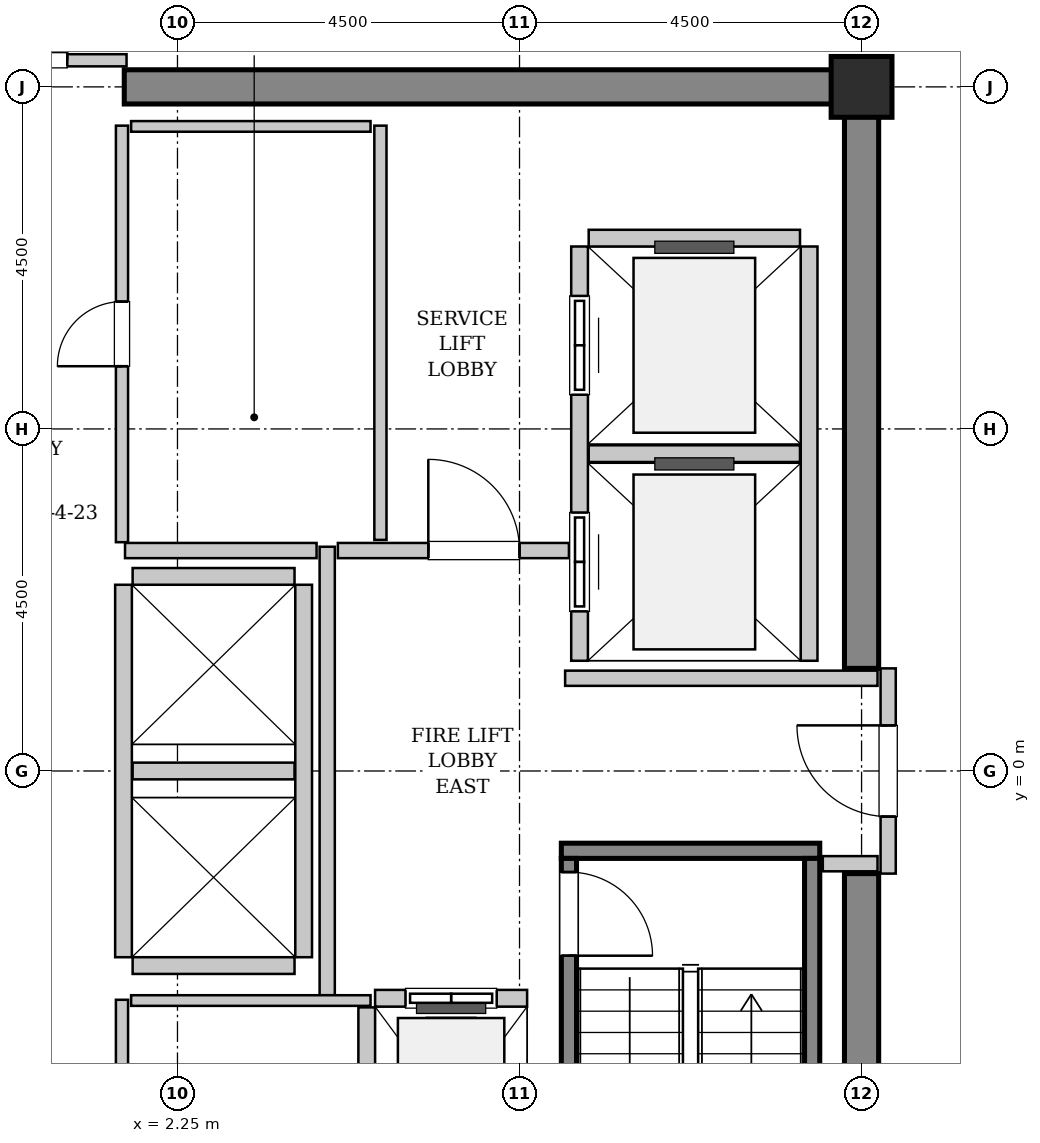
"""IFC4 building model, lengths in metres.
Left out: names, types, materials, properties, quantities, classifications, styles, units other than length and angle.
Written with IfcOpenShell. Run it as: python <this file> out.ifc"""

import sys

from ifc_helpers import new_model, si_unit, direction, frame, frame_2d, origin, origin_2d, place, context, subcontext, project, spatial, rectangle, hollow_rectangle, extrude, source, transform, mapped, element, fill, save


model = new_model("IFC4")
c1 = context("Model", 3, precision=1e-05, world=origin(), true_north=direction((0.0, 1.0)))
c2 = subcontext(c1, "Body", "Model", "MODEL_VIEW")
j1 = project(units=[si_unit("LENGTHUNIT", "METRE"), si_unit("PLANEANGLEUNIT", "RADIAN")], contexts=[c1])
p1 = place(None, origin())
s1 = spatial("IfcSite", under=j1, at=p1, CompositionType="ELEMENT")
p2 = place(p1, origin())
s2 = spatial("IfcBuilding", under=s1, at=p2, CompositionType="ELEMENT")
p3 = place(p2, frame((0.0, 0.0, 276.0)))
s3 = spatial("IfcBuildingStorey", under=s2, at=p3, CompositionType="ELEMENT", Elevation=276.0)
m1 = source(origin(), c2, "Body", "SweptSolid", [
    extrude(rectangle(XDim=9.925, YDim=0.45, at=frame_2d((4.962, 0.0))), origin(), (0.0, 0.0, 1.0), 3.8),
])
p4 = place(p3, frame((1.55, 9.0, 0.0), z_axis=(0.0, 0.0, 1.0), x_axis=(1.0, 0.0, 0.0)))
e1 = element("IfcWall", 1, at=p4, inside=s3, PredefinedType="SHEAR", context=c2, shape_type="MappedRepresentation", body=[
    mapped(m1, transform((0.0, 0.0, 0.0), x_axis=(1.0, 0.0, 0.0), y_axis=(0.0, 1.0, 0.0), z_axis=(0.0, 0.0, 1.0), scale=1.0)),
])
m2 = source(origin(), c2, "Body", "SweptSolid", [
    extrude(rectangle(XDim=7.425, YDim=0.45, at=frame_2d((3.712, 0.0))), origin(), (0.0, 0.0, 1.0), 3.8),
])
for number, where, z_axis, x_axis in (
    (2, (11.25, -8.775, 0.0), (0.0, 0.0, 1.0), (0.0, 1.0, 0.0)),
    (3, (11.25, 1.35, 0.0), (0.0, 0.0, 1.0), (0.0, 1.0, 0.0)),
):
    element("IfcWall", number, at=place(p3, frame(where, z_axis=z_axis, x_axis=x_axis)), inside=s3, PredefinedType="SHEAR", context=c2, shape_type="MappedRepresentation", body=[
        mapped(m2, transform((0.0, 0.0, 0.0), x_axis=(1.0, 0.0, 0.0), y_axis=(0.0, 1.0, 0.0), z_axis=(0.0, 0.0, 1.0), scale=1.0)),
    ])
m3 = source(origin(), c2, "Body", "SweptSolid", [
    extrude(hollow_rectangle(XDim=0.8, YDim=0.8, WallThickness=0.04, InnerFilletRadius=0.04, OuterFilletRadius=0.08, at=origin_2d()), origin(), (0.0, 0.0, 1.0), 3.8),
])
p5 = place(p3, frame((11.25, 9.0, 0.0), z_axis=(0.0, 0.0, 1.0), x_axis=(1.0, 0.0, 0.0)))
e4 = element("IfcColumn", 4, at=p5, inside=s3, PredefinedType="COLUMN", context=c2, shape_type="MappedRepresentation", body=[
    mapped(m3, transform((0.0, 0.0, 0.0), x_axis=(1.0, 0.0, 0.0), y_axis=(0.0, 1.0, 0.0), z_axis=(0.0, 0.0, 1.0), scale=1.0)),
])
m4 = source(origin(), c2, "Body", "SweptSolid", [
    extrude(rectangle(XDim=3.4, YDim=0.2, at=frame_2d((1.7, 0.0))), origin(), (0.0, 0.0, 1.0), 3.8),
])
p6 = place(p3, frame((7.3, -1.05, 0.0), z_axis=(0.0, 0.0, 1.0), x_axis=(1.0, 0.0, 0.0)))
e5 = element("IfcWall", 5, at=p6, inside=s3, PredefinedType="SOLIDWALL", context=c2, shape_type="MappedRepresentation", body=[
    mapped(m4, transform((0.0, 0.0, 0.0), x_axis=(1.0, 0.0, 0.0), y_axis=(0.0, 1.0, 0.0), z_axis=(0.0, 0.0, 1.0), scale=1.0)),
])
m5 = source(origin(), c2, "Body", "SweptSolid", [
    extrude(rectangle(XDim=7.1, YDim=0.2, at=frame_2d((3.55, 0.0))), origin(), (0.0, 0.0, 1.0), 3.8),
])
p7 = place(p3, frame((7.4, -1.15, 0.0), z_axis=(0.0, 0.0, 1.0), x_axis=(0.0, -1.0, 0.0)))
e6 = element("IfcWall", 6, at=p7, inside=s3, PredefinedType="SOLIDWALL", context=c2, shape_type="MappedRepresentation", body=[
    mapped(m5, transform((0.0, 0.0, 0.0), x_axis=(1.0, 0.0, 0.0), y_axis=(0.0, 1.0, 0.0), z_axis=(0.0, 0.0, 1.0), scale=1.0)),
])
p8 = place(p7, frame((0.18, 0.0, 0.0)))
e7 = element("IfcOpeningElement", 7, at=p8, cuts=e6, PredefinedType="OPENING", context=c2, shape_type="SweptSolid", body=[
    extrude(rectangle(XDim=1.1, YDim=2.15, at=frame_2d((0.55, 1.075))), frame((0.0, 0.11, 0.0), z_axis=(0.0, -1.0, 0.0), x_axis=(1.0, 0.0, 0.0)), (0.0, 0.0, 1.0), 0.22),
])
p9 = place(p3, frame((10.6, -1.15, 0.0), z_axis=(0.0, 0.0, 1.0), x_axis=(0.0, -1.0, 0.0)))
e8 = element("IfcWall", 8, at=p9, inside=s3, PredefinedType="SOLIDWALL", context=c2, shape_type="MappedRepresentation", body=[
    mapped(m5, transform((0.0, 0.0, 0.0), x_axis=(1.0, 0.0, 0.0), y_axis=(0.0, 1.0, 0.0), z_axis=(0.0, 0.0, 1.0), scale=1.0)),
])
m6 = source(origin(), c2, "Body", "SweptSolid", [
    extrude(rectangle(XDim=2.0, YDim=0.22, at=frame_2d((1.0, 0.0))), origin(), (0.0, 0.0, 1.0), 3.535),
])
p10 = place(p3, frame((6.85, -2.99, 0.0), z_axis=(0.0, 0.0, 1.0), x_axis=(-1.0, 0.0, 0.0)))
e9 = element("IfcWall", 9, at=p10, inside=s3, PredefinedType="SOLIDWALL", context=c2, shape_type="MappedRepresentation", body=[
    mapped(m6, transform((0.0, 0.0, 0.0), x_axis=(1.0, 0.0, 0.0), y_axis=(0.0, 1.0, 0.0), z_axis=(0.0, 0.0, 1.0), scale=1.0)),
])
p11 = place(p10, frame((0.4, 0.0, 0.0)))
e10 = element("IfcOpeningElement", 10, at=p11, cuts=e9, PredefinedType="OPENING", context=c2, shape_type="SweptSolid", body=[
    extrude(rectangle(XDim=1.2, YDim=2.2, at=frame_2d((0.6, 1.1))), frame((0.0, 0.12, 0.0), z_axis=(0.0, -1.0, 0.0), x_axis=(1.0, 0.0, 0.0)), (0.0, 0.0, 1.0), 0.24),
])
m7 = source(origin(), c2, "Body", "SweptSolid", [
    extrude(rectangle(XDim=2.68, YDim=0.22, at=frame_2d((1.34, 0.0))), origin(), (0.0, 0.0, 1.0), 3.535),
])
p12 = place(p3, frame((4.74, -3.11, 0.0), z_axis=(0.0, 0.0, 1.0), x_axis=(0.0, -1.0, 0.0)))
e11 = element("IfcWall", 11, at=p12, inside=s3, PredefinedType="SOLIDWALL", context=c2, shape_type="MappedRepresentation", body=[
    mapped(m7, transform((0.0, 0.0, 0.0), x_axis=(1.0, 0.0, 0.0), y_axis=(0.0, 1.0, 0.0), z_axis=(0.0, 0.0, 1.0), scale=1.0)),
])
m8 = source(origin(), c2, "Body", "SweptSolid", [
    extrude(rectangle(XDim=5.45, YDim=0.22, at=frame_2d((2.725, 0.0))), origin(), (0.0, 0.0, 1.0), 3.535),
])
p13 = place(p3, frame((7.54, 6.9, 0.0), z_axis=(0.0, 0.0, 1.0), x_axis=(0.0, -1.0, 0.0)))
e12 = element("IfcWall", 12, at=p13, inside=s3, PredefinedType="SOLIDWALL", context=c2, shape_type="MappedRepresentation", body=[
    mapped(m8, transform((0.0, 0.0, 0.0), x_axis=(1.0, 0.0, 0.0), y_axis=(0.0, 1.0, 0.0), z_axis=(0.0, 0.0, 1.0), scale=1.0)),
])
p14 = place(p13, frame((3.5, 0.0, 0.0)))
e13 = element("IfcOpeningElement", 13, at=p14, cuts=e12, PredefinedType="OPENING", context=c2, shape_type="SweptSolid", body=[
    extrude(rectangle(XDim=1.3, YDim=2.3, at=frame_2d((0.65, 1.15))), frame((0.0, 0.12, 0.0), z_axis=(0.0, -1.0, 0.0), x_axis=(1.0, 0.0, 0.0)), (0.0, 0.0, 1.0), 0.24),
])
p15 = place(p13, frame((0.65, 0.0, 0.0)))
e14 = element("IfcOpeningElement", 14, at=p15, cuts=e12, PredefinedType="OPENING", context=c2, shape_type="SweptSolid", body=[
    extrude(rectangle(XDim=1.3, YDim=2.3, at=frame_2d((0.65, 1.15))), frame((0.0, 0.12, 0.0), z_axis=(0.0, -1.0, 0.0), x_axis=(1.0, 0.0, 0.0)), (0.0, 0.0, 1.0), 0.24),
])
p16 = place(p3, frame((10.56, 1.45, 0.0), z_axis=(0.0, 0.0, 1.0), x_axis=(0.0, 1.0, 0.0)))
e15 = element("IfcWall", 15, at=p16, inside=s3, PredefinedType="SOLIDWALL", context=c2, shape_type="MappedRepresentation", body=[
    mapped(m8, transform((0.0, 0.0, 0.0), x_axis=(1.0, 0.0, 0.0), y_axis=(0.0, 1.0, 0.0), z_axis=(0.0, 0.0, 1.0), scale=1.0)),
])
m9 = source(origin(), c2, "Body", "SweptSolid", [
    extrude(rectangle(XDim=2.78, YDim=0.22, at=frame_2d((1.39, 0.0))), origin(), (0.0, 0.0, 1.0), 3.535),
])
for number, where, z_axis, x_axis in (
    (16, (7.66, 4.175, 0.0), (0.0, 0.0, 1.0), (1.0, 0.0, 0.0)),
    (17, (10.44, 7.01, 0.0), (0.0, 0.0, 1.0), (-1.0, 0.0, 0.0)),
):
    element("IfcWall", number, at=place(p3, frame(where, z_axis=z_axis, x_axis=x_axis)), inside=s3, PredefinedType="SOLIDWALL", context=c2, shape_type="MappedRepresentation", body=[
        mapped(m9, transform((0.0, 0.0, 0.0), x_axis=(1.0, 0.0, 0.0), y_axis=(0.0, 1.0, 0.0), z_axis=(0.0, 0.0, 1.0), scale=1.0)),
    ])
m10 = source(origin(), c2, "Body", "SweptSolid", [
    extrude(rectangle(XDim=4.9, YDim=0.22, at=frame_2d((2.45, 0.0))), origin(), (0.0, 0.0, 1.0), 3.535),
])
for number, where, z_axis, x_axis in (
    (18, (1.54, 2.45, 0.0), (0.0, 0.0, 1.0), (0.0, -1.0, 0.0)),
    (19, (3.91, -2.45, 0.0), (0.0, 0.0, 1.0), (0.0, 1.0, 0.0)),
):
    element("IfcWall", number, at=place(p3, frame(where, z_axis=z_axis, x_axis=x_axis)), inside=s3, PredefinedType="SOLIDWALL", context=c2, shape_type="MappedRepresentation", body=[
        mapped(m10, transform((0.0, 0.0, 0.0), x_axis=(1.0, 0.0, 0.0), y_axis=(0.0, 1.0, 0.0), z_axis=(0.0, 0.0, 1.0), scale=1.0)),
    ])
m11 = source(origin(), c2, "Body", "SweptSolid", [
    extrude(rectangle(XDim=2.13, YDim=0.22, at=frame_2d((1.065, 0.0))), origin(), (0.0, 0.0, 1.0), 3.535),
])
for number, where, z_axis, x_axis in (
    (20, (1.66, -2.56, 0.0), (0.0, 0.0, 1.0), (1.0, 0.0, 0.0)),
    (21, (1.66, 0.0, 0.0), (0.0, 0.0, 1.0), (1.0, 0.0, 0.0)),
    (22, (3.79, 2.56, 0.0), (0.0, 0.0, 1.0), (-1.0, 0.0, 0.0)),
):
    element("IfcWall", number, at=place(p3, frame(where, z_axis=z_axis, x_axis=x_axis)), inside=s3, PredefinedType="SOLIDWALL", context=c2, shape_type="MappedRepresentation", body=[
        mapped(m11, transform((0.0, 0.0, 0.0), x_axis=(1.0, 0.0, 0.0), y_axis=(0.0, 1.0, 0.0), z_axis=(0.0, 0.0, 1.0), scale=1.0)),
    ])
m12 = source(origin(), c2, "Body", "SweptSolid", [
    extrude(rectangle(XDim=2.7, YDim=0.2, at=frame_2d((1.35, 0.0))), origin(), (0.0, 0.0, 1.0), 2.625),
])
p17 = place(p3, frame((11.6, -1.35, 0.0), z_axis=(0.0, 0.0, 1.0), x_axis=(0.0, 1.0, 0.0)))
e23 = element("IfcWall", 23, at=p17, inside=s3, PredefinedType="PARTITIONING", context=c2, shape_type="MappedRepresentation", body=[
    mapped(m12, transform((0.0, 0.0, 0.0), x_axis=(1.0, 0.0, 0.0), y_axis=(0.0, 1.0, 0.0), z_axis=(0.0, 0.0, 1.0), scale=1.0)),
])
p18 = place(p17, frame((0.75, 0.0, 0.0)))
e24 = element("IfcOpeningElement", 24, at=p18, cuts=e23, PredefinedType="OPENING", context=c2, shape_type="SweptSolid", body=[
    extrude(rectangle(XDim=1.2, YDim=2.15, at=frame_2d((0.6, 1.075))), frame((0.0, 0.11, 0.0), z_axis=(0.0, -1.0, 0.0), x_axis=(1.0, 0.0, 0.0)), (0.0, 0.0, 1.0), 0.22),
])
m13 = source(origin(), c2, "Body", "SweptSolid", [
    extrude(rectangle(XDim=5.9, YDim=0.2, at=frame_2d((2.95, 0.0))), origin(), (0.0, 0.0, 1.0), 3.535),
])
p19 = place(p3, frame((4.22, -2.95, 0.0), z_axis=(0.0, 0.0, 1.0), x_axis=(0.0, 1.0, 0.0)))
e25 = element("IfcWall", 25, at=p19, inside=s3, PredefinedType="PARTITIONING", context=c2, shape_type="MappedRepresentation", body=[
    mapped(m13, transform((0.0, 0.0, 0.0), x_axis=(1.0, 0.0, 0.0), y_axis=(0.0, 1.0, 0.0), z_axis=(0.0, 0.0, 1.0), scale=1.0)),
])
m14 = source(origin(), c2, "Body", "SweptSolid", [
    extrude(rectangle(XDim=2.52, YDim=0.2, at=frame_2d((1.26, 0.0))), origin(), (0.0, 0.0, 1.0), 3.535),
])
p20 = place(p3, frame((1.56, 2.9, 0.0), z_axis=(0.0, 0.0, 1.0), x_axis=(1.0, 0.0, 0.0)))
e26 = element("IfcWall", 26, at=p20, inside=s3, PredefinedType="PARTITIONING", context=c2, shape_type="MappedRepresentation", body=[
    mapped(m14, transform((0.0, 0.0, 0.0), x_axis=(1.0, 0.0, 0.0), y_axis=(0.0, 1.0, 0.0), z_axis=(0.0, 0.0, 1.0), scale=1.0)),
])
m15 = source(origin(), c2, "Body", "SweptSolid", [
    extrude(rectangle(XDim=3.04, YDim=0.2, at=frame_2d((1.52, 0.0))), origin(), (0.0, 0.0, 1.0), 3.535),
])
p21 = place(p3, frame((4.36, 2.9, 0.0), z_axis=(0.0, 0.0, 1.0), x_axis=(1.0, 0.0, 0.0)))
e27 = element("IfcWall", 27, at=p21, inside=s3, PredefinedType="PARTITIONING", context=c2, shape_type="MappedRepresentation", body=[
    mapped(m15, transform((0.0, 0.0, 0.0), x_axis=(1.0, 0.0, 0.0), y_axis=(0.0, 1.0, 0.0), z_axis=(0.0, 0.0, 1.0), scale=1.0)),
])
p22 = place(p21, frame((1.19, 0.0, 0.0)))
e28 = element("IfcOpeningElement", 28, at=p22, cuts=e27, PredefinedType="OPENING", context=c2, shape_type="SweptSolid", body=[
    extrude(rectangle(XDim=1.2, YDim=2.15, at=frame_2d((0.6, 1.075))), frame((0.0, 0.11, 0.0), z_axis=(0.0, -1.0, 0.0), x_axis=(1.0, 0.0, 0.0)), (0.0, 0.0, 1.0), 0.22),
])
m16 = source(origin(), c2, "Body", "SweptSolid", [
    extrude(rectangle(XDim=4.11, YDim=0.2, at=frame_2d((2.055, 0.0))), origin(), (0.0, 0.0, 1.0), 3.535),
])
p23 = place(p3, frame((7.35, 1.22, 0.0), z_axis=(0.0, 0.0, 1.0), x_axis=(1.0, 0.0, 0.0)))
e29 = element("IfcWall", 29, at=p23, inside=s3, PredefinedType="PARTITIONING", context=c2, shape_type="MappedRepresentation", body=[
    mapped(m16, transform((0.0, 0.0, 0.0), x_axis=(1.0, 0.0, 0.0), y_axis=(0.0, 1.0, 0.0), z_axis=(0.0, 0.0, 1.0), scale=1.0)),
])
m17 = source(origin(), c2, "Body", "SweptSolid", [
    extrude(rectangle(XDim=0.72, YDim=0.2, at=frame_2d((0.36, 0.0))), origin(), (0.0, 0.0, 1.0), 3.535),
])
p24 = place(p3, frame((10.74, -1.22, 0.0), z_axis=(0.0, 0.0, 1.0), x_axis=(1.0, 0.0, 0.0)))
e30 = element("IfcWall", 30, at=p24, inside=s3, PredefinedType="PARTITIONING", context=c2, shape_type="MappedRepresentation", body=[
    mapped(m17, transform((0.0, 0.0, 0.0), x_axis=(1.0, 0.0, 0.0), y_axis=(0.0, 1.0, 0.0), z_axis=(0.0, 0.0, 1.0), scale=1.0)),
])
m18 = source(origin(), c2, "Body", "SweptSolid", [
    extrude(rectangle(XDim=3.16, YDim=0.16, at=frame_2d((1.58, 0.0))), origin(), (0.0, 0.0, 1.0), 2.625),
])
p25 = place(p3, frame((-1.58, 9.35, 0.0), z_axis=(0.0, 0.0, 1.0), x_axis=(1.0, 0.0, 0.0)))
e31 = element("IfcWall", 31, at=p25, inside=s3, PredefinedType="PARTITIONING", context=c2, shape_type="MappedRepresentation", body=[
    mapped(m18, transform((0.0, 0.0, 0.0), x_axis=(1.0, 0.0, 0.0), y_axis=(0.0, 1.0, 0.0), z_axis=(0.0, 0.0, 1.0), scale=1.0)),
])
p26 = place(p25, frame((0.78, 0.0, 0.0)))
e32 = element("IfcOpeningElement", 32, at=p26, cuts=e31, PredefinedType="OPENING", context=c2, shape_type="SweptSolid", body=[
    extrude(rectangle(XDim=1.6, YDim=2.3, at=frame_2d((0.8, 1.15))), frame((0.0, 0.09, 0.0), z_axis=(0.0, -1.0, 0.0), x_axis=(1.0, 0.0, 0.0)), (0.0, 0.0, 1.0), 0.18),
])
m19 = source(origin(), c2, "Body", "SweptSolid", [
    extrude(rectangle(XDim=5.45, YDim=0.16, at=frame_2d((2.725, 0.0))), origin(), (0.0, 0.0, 1.0), 3.535),
])
p27 = place(p3, frame((4.92, 3.04, 0.0), z_axis=(0.0, 0.0, 1.0), x_axis=(0.0, 1.0, 0.0)))
e33 = element("IfcWall", 33, at=p27, inside=s3, PredefinedType="PARTITIONING", context=c2, shape_type="MappedRepresentation", body=[
    mapped(m19, transform((0.0, 0.0, 0.0), x_axis=(1.0, 0.0, 0.0), y_axis=(0.0, 1.0, 0.0), z_axis=(0.0, 0.0, 1.0), scale=1.0)),
])
m20 = source(origin(), c2, "Body", "SweptSolid", [
    extrude(rectangle(XDim=5.48, YDim=0.16, at=frame_2d((2.74, 0.0))), origin(), (0.0, 0.0, 1.0), 3.535),
])
p28 = place(p3, frame((1.52, 3.01, 0.0), z_axis=(0.0, 0.0, 1.0), x_axis=(0.0, 1.0, 0.0)))
e34 = element("IfcWall", 34, at=p28, inside=s3, PredefinedType="PARTITIONING", context=c2, shape_type="MappedRepresentation", body=[
    mapped(m20, transform((0.0, 0.0, 0.0), x_axis=(1.0, 0.0, 0.0), y_axis=(0.0, 1.0, 0.0), z_axis=(0.0, 0.0, 1.0), scale=1.0)),
])
p29 = place(p28, frame((2.315, 0.0, 0.0)))
e35 = element("IfcOpeningElement", 35, at=p29, cuts=e34, PredefinedType="OPENING", context=c2, shape_type="SweptSolid", body=[
    extrude(rectangle(XDim=0.85, YDim=2.1, at=frame_2d((0.425, 1.05))), frame((0.0, 0.09, 0.0), z_axis=(0.0, -1.0, 0.0), x_axis=(1.0, 0.0, 0.0)), (0.0, 0.0, 1.0), 0.18),
])
m21 = source(origin(), c2, "Body", "SweptSolid", [
    extrude(rectangle(XDim=3.15, YDim=0.14, at=frame_2d((1.575, 0.0))), origin(), (0.0, 0.0, 1.0), 3.535),
])
p30 = place(p3, frame((1.64, 8.48, 0.0), z_axis=(0.0, 0.0, 1.0), x_axis=(1.0, 0.0, 0.0)))
e36 = element("IfcWall", 36, at=p30, inside=s3, PredefinedType="PARTITIONING", context=c2, shape_type="MappedRepresentation", body=[
    mapped(m21, transform((0.0, 0.0, 0.0), x_axis=(1.0, 0.0, 0.0), y_axis=(0.0, 1.0, 0.0), z_axis=(0.0, 0.0, 1.0), scale=1.0)),
])
p31 = place(p3, frame((1.52, -8.49, 0.0), z_axis=(0.0, 0.0, 1.0), x_axis=(0.0, 1.0, 0.0)))
e37 = element("IfcWall", 37, at=p31, inside=s3, PredefinedType="PARTITIONING", context=c2, shape_type="MappedRepresentation", body=[
    mapped(m20, transform((0.0, 0.0, 0.0), x_axis=(1.0, 0.0, 0.0), y_axis=(0.0, 1.0, 0.0), z_axis=(0.0, 0.0, 1.0), scale=1.0)),
])
p32 = place(p31, frame((2.315, 0.0, 0.0)))
e38 = element("IfcOpeningElement", 38, at=p32, cuts=e37, PredefinedType="OPENING", context=c2, shape_type="SweptSolid", body=[
    extrude(rectangle(XDim=0.85, YDim=2.1, at=frame_2d((0.425, 1.05))), frame((0.0, 0.09, 0.0), z_axis=(0.0, -1.0, 0.0), x_axis=(1.0, 0.0, 0.0)), (0.0, 0.0, 1.0), 0.18),
])
p33 = place(p3, frame((1.64, -3.02, 0.0), z_axis=(0.0, 0.0, 1.0), x_axis=(1.0, 0.0, 0.0)))
e39 = element("IfcWall", 39, at=p33, inside=s3, PredefinedType="PARTITIONING", context=c2, shape_type="MappedRepresentation", body=[
    mapped(m21, transform((0.0, 0.0, 0.0), x_axis=(1.0, 0.0, 0.0), y_axis=(0.0, 1.0, 0.0), z_axis=(0.0, 0.0, 1.0), scale=1.0)),
])
m22 = source(origin(), c2, "Body", "SweptSolid", [
    extrude(rectangle(XDim=1.1, YDim=2.15, at=frame_2d((0.55, 1.075))), frame((0.0, 0.025, 0.0), z_axis=(0.0, -1.0, 0.0), x_axis=(1.0, 0.0, 0.0)), (0.0, 0.0, 1.0), 0.05),
])
p34 = place(p8, origin())
e40 = element("IfcDoor", 40, at=p34, inside=s3, OperationType="SINGLE_SWING_RIGHT", PredefinedType="DOOR", context=c2, shape_type="MappedRepresentation", body=[
    mapped(m22, transform((0.0, 0.0, 0.0), x_axis=(1.0, 0.0, 0.0), y_axis=(0.0, 1.0, 0.0), z_axis=(0.0, 0.0, 1.0), scale=1.0)),
])
fill(e7, e40)
m23 = source(origin(), c2, "Body", "SweptSolid", [
    extrude(rectangle(XDim=1.2, YDim=2.2, at=frame_2d((0.6, 1.1))), frame((0.0, 0.025, 0.0), z_axis=(0.0, -1.0, 0.0), x_axis=(1.0, 0.0, 0.0)), (0.0, 0.0, 1.0), 0.05),
])
p35 = place(p11, origin())
e41 = element("IfcDoor", 41, at=p35, inside=s3, OperationType="SLIDING_TO_LEFT", PredefinedType="DOOR", context=c2, shape_type="MappedRepresentation", body=[
    mapped(m23, transform((0.0, 0.0, 0.0), x_axis=(1.0, 0.0, 0.0), y_axis=(0.0, 1.0, 0.0), z_axis=(0.0, 0.0, 1.0), scale=1.0)),
])
fill(e10, e41)
m24 = source(origin(), c2, "Body", "SweptSolid", [
    extrude(rectangle(XDim=1.3, YDim=2.3, at=frame_2d((0.65, 1.15))), frame((0.0, 0.025, 0.0), z_axis=(0.0, -1.0, 0.0), x_axis=(1.0, 0.0, 0.0)), (0.0, 0.0, 1.0), 0.05),
])
p36 = place(p14, origin())
e42 = element("IfcDoor", 42, at=p36, inside=s3, OperationType="SLIDING_TO_RIGHT", PredefinedType="DOOR", context=c2, shape_type="MappedRepresentation", body=[
    mapped(m24, transform((0.0, 0.0, 0.0), x_axis=(1.0, 0.0, 0.0), y_axis=(0.0, 1.0, 0.0), z_axis=(0.0, 0.0, 1.0), scale=1.0)),
])
fill(e13, e42)
p37 = place(p15, origin())
e43 = element("IfcDoor", 43, at=p37, inside=s3, OperationType="SLIDING_TO_RIGHT", PredefinedType="DOOR", context=c2, shape_type="MappedRepresentation", body=[
    mapped(m24, transform((0.0, 0.0, 0.0), x_axis=(1.0, 0.0, 0.0), y_axis=(0.0, 1.0, 0.0), z_axis=(0.0, 0.0, 1.0), scale=1.0)),
])
fill(e14, e43)
m25 = source(origin(), c2, "Body", "SweptSolid", [
    extrude(rectangle(XDim=1.2, YDim=2.15, at=frame_2d((0.6, 1.075))), frame((0.0, 0.025, 0.0), z_axis=(0.0, -1.0, 0.0), x_axis=(1.0, 0.0, 0.0)), (0.0, 0.0, 1.0), 0.05),
])
p38 = place(p18, origin())
e44 = element("IfcDoor", 44, at=p38, inside=s3, OperationType="SINGLE_SWING_RIGHT", PredefinedType="DOOR", context=c2, shape_type="MappedRepresentation", body=[
    mapped(m25, transform((0.0, 0.0, 0.0), x_axis=(1.0, 0.0, 0.0), y_axis=(0.0, 1.0, 0.0), z_axis=(0.0, 0.0, 1.0), scale=1.0)),
])
fill(e24, e44)
p39 = place(p22, origin())
e45 = element("IfcDoor", 45, at=p39, inside=s3, OperationType="SINGLE_SWING_LEFT", PredefinedType="DOOR", context=c2, shape_type="MappedRepresentation", body=[
    mapped(m25, transform((0.0, 0.0, 0.0), x_axis=(1.0, 0.0, 0.0), y_axis=(0.0, 1.0, 0.0), z_axis=(0.0, 0.0, 1.0), scale=1.0)),
])
fill(e28, e45)
m26 = source(origin(), c2, "Body", "SweptSolid", [
    extrude(rectangle(XDim=1.6, YDim=2.3, at=frame_2d((0.8, 1.15))), frame((0.0, 0.025, 0.0), z_axis=(0.0, -1.0, 0.0), x_axis=(1.0, 0.0, 0.0)), (0.0, 0.0, 1.0), 0.05),
])
p40 = place(p26, origin())
e46 = element("IfcDoor", 46, at=p40, inside=s3, OperationType="DOUBLE_DOOR_SINGLE_SWING", PredefinedType="DOOR", context=c2, shape_type="MappedRepresentation", body=[
    mapped(m26, transform((0.0, 0.0, 0.0), x_axis=(1.0, 0.0, 0.0), y_axis=(0.0, 1.0, 0.0), z_axis=(0.0, 0.0, 1.0), scale=1.0)),
])
fill(e32, e46)
m27 = source(origin(), c2, "Body", "SweptSolid", [
    extrude(rectangle(XDim=0.85, YDim=2.1, at=frame_2d((0.425, 1.05))), frame((0.0, 0.025, 0.0), z_axis=(0.0, -1.0, 0.0), x_axis=(1.0, 0.0, 0.0)), (0.0, 0.0, 1.0), 0.05),
])
p41 = place(p29, origin())
e47 = element("IfcDoor", 47, at=p41, inside=s3, OperationType="SINGLE_SWING_LEFT", PredefinedType="DOOR", context=c2, shape_type="MappedRepresentation", body=[
    mapped(m27, transform((0.0, 0.0, 0.0), x_axis=(1.0, 0.0, 0.0), y_axis=(0.0, 1.0, 0.0), z_axis=(0.0, 0.0, 1.0), scale=1.0)),
])
fill(e35, e47)
save(model, sys.argv[1])
